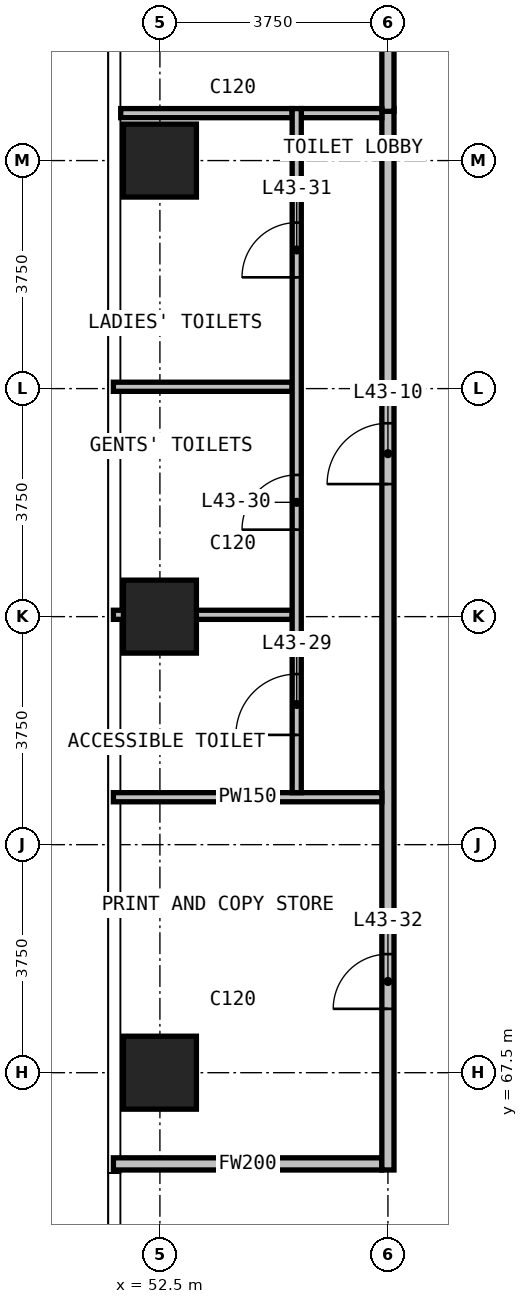
"""IFC4 building model, lengths in metres.
Left out: names, types, materials, properties, quantities, classifications, styles, units other than length and angle.
Written with IfcOpenShell. Run it as: python <this file> out.ifc"""

import sys

from ifc_helpers import new_model, si_unit, direction, frame, frame_2d, origin, origin_2d, place, context, subcontext, project, spatial, rectangle, extrude, element, fill, save


model = new_model("IFC4")
c1 = context("Model", 3, precision=1e-05, world=origin(), true_north=direction((0.0, 1.0)))
c2 = subcontext(c1, "Body", "Model", "MODEL_VIEW")
j1 = project(units=[si_unit("LENGTHUNIT", "METRE"), si_unit("PLANEANGLEUNIT", "RADIAN")], contexts=[c1])
p1 = place(None, origin())
s1 = spatial("IfcSite", under=j1, at=p1, CompositionType="ELEMENT")
p2 = place(p1, origin())
s2 = spatial("IfcBuilding", under=s1, at=p2, CompositionType="ELEMENT")
p3 = place(p2, frame((0.0, 0.0, 169.3)))
s3 = spatial("IfcBuildingStorey", under=s2, at=p3, CompositionType="ELEMENT", Elevation=169.3)
for number, where, z_axis, x_axis in (
    (1, (52.5, 67.5, 0.0), (0.0, 0.0, 1.0), (1.0, 0.0, 0.0)),
    (2, (52.5, 75.0, 0.0), (0.0, 0.0, 1.0), (1.0, 0.0, 0.0)),
    (3, (52.5, 82.5, 0.0), (0.0, 0.0, 1.0), (1.0, 0.0, 0.0)),
):
    element("IfcColumn", number, at=place(p3, frame(where, z_axis=z_axis, x_axis=x_axis)), inside=s3, PredefinedType="COLUMN", context=c2, shape_type="SweptSolid", body=[
        extrude(rectangle(XDim=1.2, YDim=1.2, at=origin_2d()), origin(), (0.0, 0.0, 1.0), 3.6),
    ])
p4 = place(p3, frame((51.735, 66.0, 0.0), z_axis=(0.0, 0.0, 1.0), x_axis=(1.0, 0.0, 0.0)))
e4 = element("IfcWall", 4, at=p4, inside=s3, PredefinedType="PARTITIONING", context=c2, shape_type="SweptSolid", body=[
    extrude(rectangle(XDim=4.415, YDim=0.2, at=frame_2d((2.208, 0.0))), origin(), (0.0, 0.0, 1.0), 3.3),
])
p5 = place(p3, frame((56.25, 65.9, 0.0), z_axis=(0.0, 0.0, 1.0), x_axis=(0.0, 1.0, 0.0)))
e5 = element("IfcWall", 5, at=p5, inside=s3, PredefinedType="PARTITIONING", context=c2, shape_type="SweptSolid", body=[
    extrude(rectangle(XDim=17.455, YDim=0.2, at=frame_2d((8.728, 0.0))), origin(), (0.0, 0.0, 1.0), 3.3),
])
p6 = place(p5, frame((11.28, 0.0, 0.0)))
e6 = element("IfcOpeningElement", 6, at=p6, cuts=e5, PredefinedType="OPENING", context=c2, shape_type="SweptSolid", body=[
    extrude(rectangle(XDim=1.0, YDim=2.2, at=frame_2d((0.5, 1.1))), frame((0.0, 0.11, 0.0), z_axis=(0.0, -1.0, 0.0), x_axis=(1.0, 0.0, 0.0)), (0.0, 0.0, 1.0), 0.22),
])
p7 = place(p5, frame((2.65, 0.0, 0.0)))
e7 = element("IfcOpeningElement", 7, at=p7, cuts=e5, PredefinedType="OPENING", context=c2, shape_type="SweptSolid", body=[
    extrude(rectangle(XDim=0.9, YDim=2.2, at=frame_2d((0.45, 1.1))), frame((0.0, 0.11, 0.0), z_axis=(0.0, -1.0, 0.0), x_axis=(1.0, 0.0, 0.0)), (0.0, 0.0, 1.0), 0.22),
])
p8 = place(p3, frame((56.25, 83.31, 0.0), z_axis=(0.0, 0.0, 1.0), x_axis=(0.0, 1.0, 0.0)))
e8 = element("IfcWall", 8, at=p8, inside=s3, PredefinedType="PARTITIONING", context=c2, shape_type="SweptSolid", body=[
    extrude(rectangle(XDim=7.335, YDim=0.2, at=frame_2d((3.667, 0.0))), origin(), (0.0, 0.0, 1.0), 3.3),
])
p9 = place(p3, frame((51.735, 72.03, 0.0), z_axis=(0.0, 0.0, 1.0), x_axis=(1.0, 0.0, 0.0)))
e9 = element("IfcWall", 9, at=p9, inside=s3, PredefinedType="PARTITIONING", context=c2, shape_type="SweptSolid", body=[
    extrude(rectangle(XDim=4.415, YDim=0.15, at=frame_2d((2.208, 0.0))), origin(), (0.0, 0.0, 1.0), 3.3),
])
for number, where, z_axis, x_axis in (
    (10, (51.735, 75.03, 0.0), (0.0, 0.0, 1.0), (1.0, 0.0, 0.0)),
    (11, (51.735, 78.78, 0.0), (0.0, 0.0, 1.0), (1.0, 0.0, 0.0)),
):
    element("IfcWall", number, at=place(p3, frame(where, z_axis=z_axis, x_axis=x_axis)), inside=s3, PredefinedType="PARTITIONING", context=c2, shape_type="SweptSolid", body=[
        extrude(rectangle(XDim=2.94, YDim=0.15, at=frame_2d((1.47, 0.0))), origin(), (0.0, 0.0, 1.0), 3.3),
    ])
p10 = place(p3, frame((51.855, 83.28, 0.0), z_axis=(0.0, 0.0, 1.0), x_axis=(1.0, 0.0, 0.0)))
e12 = element("IfcWall", 12, at=p10, inside=s3, PredefinedType="PARTITIONING", context=c2, shape_type="SweptSolid", body=[
    extrude(rectangle(XDim=2.82, YDim=0.15, at=frame_2d((1.41, 0.0))), origin(), (0.0, 0.0, 1.0), 3.3),
])
p11 = place(p3, frame((54.825, 83.28, 0.0), z_axis=(0.0, 0.0, 1.0), x_axis=(1.0, 0.0, 0.0)))
e13 = element("IfcWall", 13, at=p11, inside=s3, PredefinedType="PARTITIONING", context=c2, shape_type="SweptSolid", body=[
    extrude(rectangle(XDim=1.325, YDim=0.15, at=frame_2d((0.663, 0.0))), origin(), (0.0, 0.0, 1.0), 3.3),
])
p12 = place(p3, frame((54.75, 72.105, 0.0), z_axis=(0.0, 0.0, 1.0), x_axis=(0.0, 1.0, 0.0)))
e14 = element("IfcWall", 14, at=p12, inside=s3, PredefinedType="PARTITIONING", context=c2, shape_type="SweptSolid", body=[
    extrude(rectangle(XDim=11.25, YDim=0.15, at=frame_2d((5.625, 0.0))), origin(), (0.0, 0.0, 1.0), 3.3),
])
p13 = place(p12, frame((0.95, 0.0, 0.0)))
e15 = element("IfcOpeningElement", 15, at=p13, cuts=e14, PredefinedType="OPENING", context=c2, shape_type="SweptSolid", body=[
    extrude(rectangle(XDim=1.0, YDim=2.2, at=frame_2d((0.5, 1.1))), frame((0.0, 0.085, 0.0), z_axis=(0.0, -1.0, 0.0), x_axis=(1.0, 0.0, 0.0)), (0.0, 0.0, 1.0), 0.17),
])
p14 = place(p12, frame((4.325, 0.0, 0.0)))
e16 = element("IfcOpeningElement", 16, at=p14, cuts=e14, PredefinedType="OPENING", context=c2, shape_type="SweptSolid", body=[
    extrude(rectangle(XDim=0.9, YDim=2.2, at=frame_2d((0.45, 1.1))), frame((0.0, 0.085, 0.0), z_axis=(0.0, -1.0, 0.0), x_axis=(1.0, 0.0, 0.0)), (0.0, 0.0, 1.0), 0.17),
])
p15 = place(p12, frame((8.475, 0.0, 0.0)))
e17 = element("IfcOpeningElement", 17, at=p15, cuts=e14, PredefinedType="OPENING", context=c2, shape_type="SweptSolid", body=[
    extrude(rectangle(XDim=0.9, YDim=2.2, at=frame_2d((0.45, 1.1))), frame((0.0, 0.085, 0.0), z_axis=(0.0, -1.0, 0.0), x_axis=(1.0, 0.0, 0.0)), (0.0, 0.0, 1.0), 0.17),
])
p16 = place(p6, origin())
e18 = element("IfcDoor", 18, at=p16, inside=s3, OperationType="SINGLE_SWING_LEFT", PredefinedType="DOOR", context=c2, shape_type="SweptSolid", body=[
    extrude(rectangle(XDim=1.0, YDim=2.2, at=frame_2d((0.5, 1.1))), frame((0.0, 0.025, 0.0), z_axis=(0.0, -1.0, 0.0), x_axis=(1.0, 0.0, 0.0)), (0.0, 0.0, 1.0), 0.05),
])
fill(e6, e18)
p17 = place(p13, origin())
e19 = element("IfcDoor", 19, at=p17, inside=s3, OperationType="SINGLE_SWING_RIGHT", PredefinedType="DOOR", context=c2, shape_type="SweptSolid", body=[
    extrude(rectangle(XDim=1.0, YDim=2.2, at=frame_2d((0.5, 1.1))), frame((0.0, 0.025, 0.0), z_axis=(0.0, -1.0, 0.0), x_axis=(1.0, 0.0, 0.0)), (0.0, 0.0, 1.0), 0.05),
])
fill(e15, e19)
p18 = place(p14, origin())
e20 = element("IfcDoor", 20, at=p18, inside=s3, OperationType="SINGLE_SWING_LEFT", PredefinedType="DOOR", context=c2, shape_type="SweptSolid", body=[
    extrude(rectangle(XDim=0.9, YDim=2.2, at=frame_2d((0.45, 1.1))), frame((0.0, 0.025, 0.0), z_axis=(0.0, -1.0, 0.0), x_axis=(1.0, 0.0, 0.0)), (0.0, 0.0, 1.0), 0.05),
])
fill(e16, e20)
p19 = place(p15, origin())
e21 = element("IfcDoor", 21, at=p19, inside=s3, OperationType="SINGLE_SWING_LEFT", PredefinedType="DOOR", context=c2, shape_type="SweptSolid", body=[
    extrude(rectangle(XDim=0.9, YDim=2.2, at=frame_2d((0.45, 1.1))), frame((0.0, 0.025, 0.0), z_axis=(0.0, -1.0, 0.0), x_axis=(1.0, 0.0, 0.0)), (0.0, 0.0, 1.0), 0.05),
])
fill(e17, e21)
p20 = place(p7, origin())
e22 = element("IfcDoor", 22, at=p20, inside=s3, OperationType="SINGLE_SWING_RIGHT", PredefinedType="DOOR", context=c2, shape_type="SweptSolid", body=[
    extrude(rectangle(XDim=0.9, YDim=2.2, at=frame_2d((0.45, 1.1))), frame((0.0, 0.025, 0.0), z_axis=(0.0, -1.0, 0.0), x_axis=(1.0, 0.0, 0.0)), (0.0, 0.0, 1.0), 0.05),
])
fill(e7, e22)
save(model, sys.argv[1])
